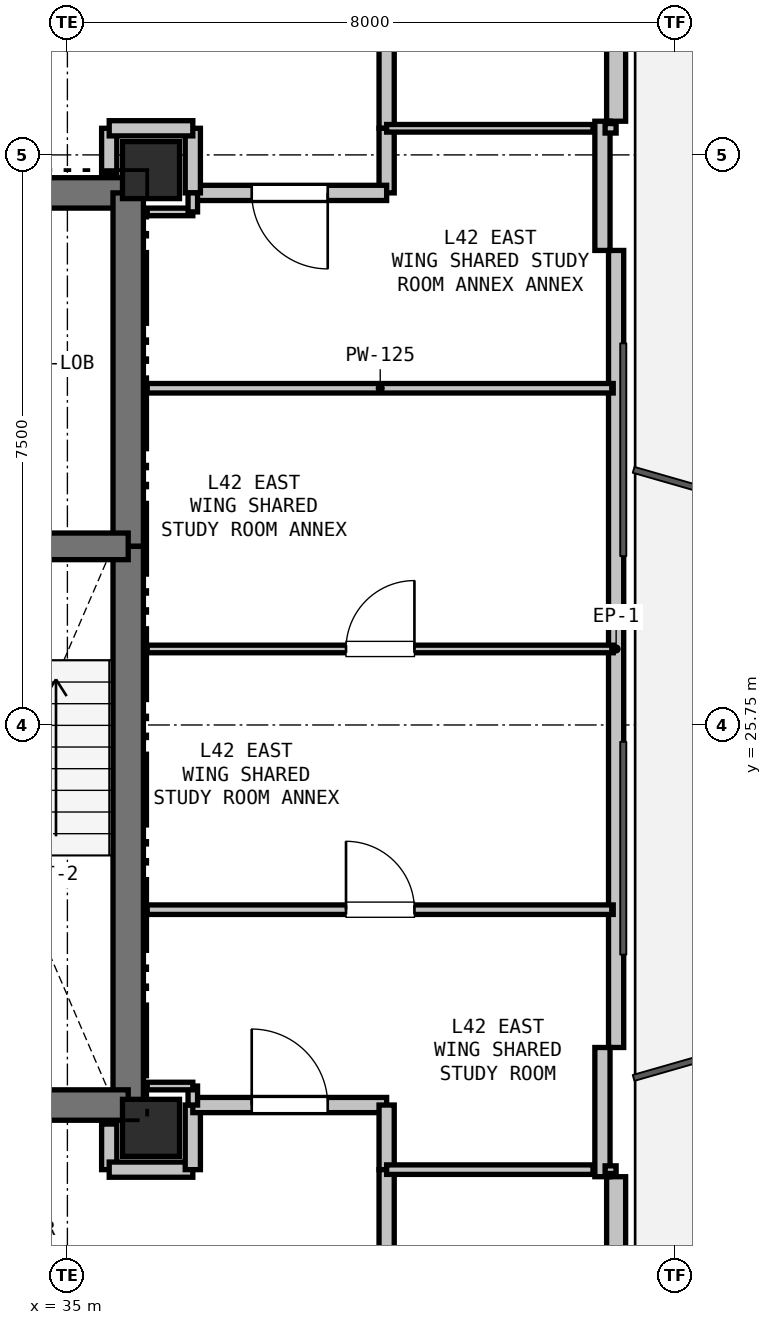
"""IFC4 building model, lengths in metres.
Left out: names, types, materials, properties, quantities, classifications, styles, units other than length and angle.
Written with IfcOpenShell. Run it as: python <this file> out.ifc"""

import sys

from ifc_helpers import new_model, si_unit, direction, frame, frame_2d, origin, origin_2d, place, context, subcontext, project, spatial, rectangle, extrude, element, fill, save


model = new_model("IFC4")
c1 = context("Model", 3, precision=1e-05, world=origin(), true_north=direction((0.0, 1.0)))
c2 = subcontext(c1, "Body", "Model", "MODEL_VIEW")
j1 = project(units=[si_unit("LENGTHUNIT", "METRE"), si_unit("PLANEANGLEUNIT", "RADIAN")], contexts=[c1])
p1 = place(None, origin())
s1 = spatial("IfcSite", under=j1, at=p1, CompositionType="ELEMENT")
p2 = place(p1, origin())
s2 = spatial("IfcBuilding", under=s1, at=p2, CompositionType="ELEMENT")
p3 = place(p2, frame((0.0, 0.0, 150.9)))
s3 = spatial("IfcBuildingStorey", under=s2, at=p3, CompositionType="ELEMENT", Elevation=150.9)
for number, where, z_axis, x_axis in (
    (1, (36.1, 33.05, 0.0), (0.0, 0.0, 1.0), (1.0, 0.0, 0.0)),
    (2, (36.1, 20.45, 0.0), (0.0, 0.0, 1.0), (1.0, 0.0, 0.0)),
):
    element("IfcColumn", number, at=place(p3, frame(where, z_axis=z_axis, x_axis=x_axis)), inside=s3, PredefinedType="COLUMN", context=c2, shape_type="SweptSolid", body=[
        extrude(rectangle(XDim=0.75, YDim=0.75, at=origin_2d()), origin(), (0.0, 0.0, 1.0), 3.3),
    ])
p4 = place(p3, frame((42.219, 44.879, 0.0), z_axis=(0.0, 0.0, 1.0), x_axis=(0.0, -1.0, 0.0)))
e3 = element("IfcWall", 3, at=p4, inside=s3, PredefinedType="SOLIDWALL", context=c2, shape_type="SweptSolid", body=[
    extrude(rectangle(XDim=11.186, YDim=0.25, at=frame_2d((5.593, 0.0))), origin(), (0.0, 0.0, 1.0), 2.68),
])
p5 = place(p4, frame((7.095, 0.0, 0.0)))
e4 = element("IfcOpeningElement", 4, at=p5, cuts=e3, PredefinedType="OPENING", context=c2, shape_type="SweptSolid", body=[
    extrude(rectangle(XDim=1.1, YDim=2.1, at=frame_2d((0.55, 1.05))), frame((0.0, 0.135, 0.0), z_axis=(0.0, -1.0, 0.0), x_axis=(1.0, 0.0, 0.0)), (0.0, 0.0, 1.0), 0.27),
])
p6 = place(p3, frame((42.219, 31.993, 0.0), z_axis=(0.0, 0.0, 1.0), x_axis=(0.0, -1.0, 0.0)))
e5 = element("IfcWall", 5, at=p6, inside=s3, PredefinedType="PARAPET", context=c2, shape_type="SweptSolid", body=[
    extrude(rectangle(XDim=10.486, YDim=0.2, at=frame_2d((5.243, 0.0))), origin(), (0.0, 0.0, 1.0), 0.2),
])
p7 = place(p3, frame((42.219, 19.807, 0.0), z_axis=(0.0, 0.0, 1.0), x_axis=(0.0, -1.0, 0.0)))
e6 = element("IfcWall", 6, at=p7, inside=s3, PredefinedType="SOLIDWALL", context=c2, shape_type="SweptSolid", body=[
    extrude(rectangle(XDim=11.186, YDim=0.25, at=frame_2d((5.593, 0.0))), origin(), (0.0, 0.0, 1.0), 2.68),
])
p8 = place(p7, frame((2.796, 0.0, 0.9)))
e7 = element("IfcOpeningElement", 7, at=p8, cuts=e6, PredefinedType="OPENING", context=c2, shape_type="SweptSolid", body=[
    extrude(rectangle(XDim=1.2, YDim=1.5, at=frame_2d((0.6, 0.75))), frame((0.0, 0.135, 0.0), z_axis=(0.0, -1.0, 0.0), x_axis=(1.0, 0.0, 0.0)), (0.0, 0.0, 1.0), 0.27),
])
for number, where, z_axis, x_axis in (
    (8, (42.039, 33.693, 0.0), (0.0, 0.0, 1.0), (0.0, -1.0, 0.0)),
    (9, (42.039, 21.507, 0.0), (0.0, 0.0, 1.0), (0.0, -1.0, 0.0)),
):
    element("IfcWall", number, at=place(p3, frame(where, z_axis=z_axis, x_axis=x_axis)), inside=s3, PredefinedType="PARAPET", context=c2, shape_type="SweptSolid", body=[
        extrude(rectangle(XDim=1.7, YDim=0.2, at=frame_2d((0.85, 0.0))), origin(), (0.0, 0.0, 1.0), 2.68),
    ])
p9 = place(p3, frame((32.35, 32.75, 0.0), z_axis=(0.0, 0.0, 1.0), x_axis=(1.0, 0.0, 0.0)))
e10 = element("IfcWall", 10, at=p9, inside=s3, PredefinedType="SHEAR", context=c2, shape_type="SweptSolid", body=[
    extrude(rectangle(XDim=3.45, YDim=0.4, at=frame_2d((1.725, 0.0))), origin(), (0.0, 0.0, 1.0), 3.06),
])
p10 = place(p9, frame((0.65, 0.0, 0.0)))
e11 = element("IfcOpeningElement", 11, at=p10, cuts=e10, PredefinedType="OPENING", context=c2, shape_type="SweptSolid", body=[
    extrude(rectangle(XDim=1.15, YDim=2.15, at=frame_2d((0.575, 1.075))), frame((0.0, 0.21, 0.0), z_axis=(0.0, -1.0, 0.0), x_axis=(1.0, 0.0, 0.0)), (0.0, 0.0, 1.0), 0.42),
])
p11 = place(p3, frame((35.8, 32.75, 0.0), z_axis=(0.0, 0.0, 1.0), x_axis=(0.0, -1.0, 0.0)))
e12 = element("IfcWall", 12, at=p11, inside=s3, PredefinedType="SHEAR", context=c2, shape_type="SweptSolid", body=[
    extrude(rectangle(XDim=4.65, YDim=0.4, at=frame_2d((2.325, 0.0))), origin(), (0.0, 0.0, 1.0), 3.06),
])
p12 = place(p3, frame((35.8, 28.1, 0.0), z_axis=(0.0, 0.0, 1.0), x_axis=(0.0, -1.0, 0.0)))
e13 = element("IfcWall", 13, at=p12, inside=s3, PredefinedType="SHEAR", context=c2, shape_type="SweptSolid", body=[
    extrude(rectangle(XDim=7.35, YDim=0.4, at=frame_2d((3.675, 0.0))), origin(), (0.0, 0.0, 1.0), 3.06),
])
p13 = place(p3, frame((35.8, 20.75, 0.0), z_axis=(0.0, 0.0, 1.0), x_axis=(-1.0, 0.0, 0.0)))
e14 = element("IfcWall", 14, at=p13, inside=s3, PredefinedType="SHEAR", context=c2, shape_type="SweptSolid", body=[
    extrude(rectangle(XDim=3.45, YDim=0.4, at=frame_2d((1.725, 0.0))), origin(), (0.0, 0.0, 1.0), 3.06),
])
p14 = place(p3, frame((32.35, 28.1, 0.0), z_axis=(0.0, 0.0, 1.0), x_axis=(1.0, 0.0, 0.0)))
e15 = element("IfcWall", 15, at=p14, inside=s3, PredefinedType="SHEAR", context=c2, shape_type="SweptSolid", body=[
    extrude(rectangle(XDim=3.45, YDim=0.35, at=frame_2d((1.725, 0.0))), origin(), (0.0, 0.0, 1.0), 3.06),
])
p15 = place(p14, frame((1.15, 0.0, 0.0)))
e16 = element("IfcOpeningElement", 16, at=p15, cuts=e15, PredefinedType="OPENING", context=c2, shape_type="SweptSolid", body=[
    extrude(rectangle(XDim=1.15, YDim=2.15, at=frame_2d((0.575, 1.075))), frame((0.0, 0.185, 0.0), z_axis=(0.0, -1.0, 0.0), x_axis=(1.0, 0.0, 0.0)), (0.0, 0.0, 1.0), 0.37),
])
p16 = place(p3, frame((35.55, 33.6, 0.0), z_axis=(0.0, 0.0, 1.0), x_axis=(0.0, -1.0, 0.0)))
e17 = element("IfcWall", 17, at=p16, inside=s3, PredefinedType="PARTITIONING", context=c2, shape_type="SweptSolid", body=[
    extrude(rectangle(XDim=0.6, YDim=0.2, at=frame_2d((0.3, 0.0))), origin(), (0.0, 0.0, 1.0), 2.585),
])
p17 = place(p3, frame((39.2, 35.35, 0.0), z_axis=(0.0, 0.0, 1.0), x_axis=(0.0, -1.0, 0.0)))
e18 = element("IfcWall", 18, at=p17, inside=s3, PredefinedType="PARTITIONING", context=c2, shape_type="SweptSolid", body=[
    extrude(rectangle(XDim=1.75, YDim=0.2, at=frame_2d((0.875, 0.0))), origin(), (0.0, 0.0, 1.0), 3.06),
])
p18 = place(p3, frame((39.2, 33.6, 0.0), z_axis=(0.0, 0.0, 1.0), x_axis=(0.0, -1.0, 0.0)))
e19 = element("IfcWall", 19, at=p18, inside=s3, PredefinedType="PARTITIONING", context=c2, shape_type="SweptSolid", body=[
    extrude(rectangle(XDim=0.85, YDim=0.2, at=frame_2d((0.425, 0.0))), origin(), (0.0, 0.0, 1.0), 3.06),
])
p19 = place(p3, frame((39.2, 32.75, 0.0), z_axis=(0.0, 0.0, 1.0), x_axis=(-1.0, 0.0, 0.0)))
e20 = element("IfcWall", 20, at=p19, inside=s3, PredefinedType="PARTITIONING", context=c2, shape_type="SweptSolid", body=[
    extrude(rectangle(XDim=2.55, YDim=0.2, at=frame_2d((1.275, 0.0))), origin(), (0.0, 0.0, 1.0), 3.06),
])
p20 = place(p19, frame((0.775, 0.0, 0.0)))
e21 = element("IfcOpeningElement", 21, at=p20, cuts=e20, PredefinedType="OPENING", context=c2, shape_type="SweptSolid", body=[
    extrude(rectangle(XDim=1.0, YDim=2.15, at=frame_2d((0.5, 1.075))), frame((0.0, 0.11, 0.0), z_axis=(0.0, -1.0, 0.0), x_axis=(1.0, 0.0, 0.0)), (0.0, 0.0, 1.0), 0.22),
])
p21 = place(p3, frame((36.65, 32.75, 0.0), z_axis=(0.0, 0.0, 1.0), x_axis=(0.0, 1.0, 0.0)))
e22 = element("IfcWall", 22, at=p21, inside=s3, PredefinedType="PARTITIONING", context=c2, shape_type="SweptSolid", body=[
    extrude(rectangle(XDim=0.85, YDim=0.2, at=frame_2d((0.425, 0.0))), origin(), (0.0, 0.0, 1.0), 2.433),
])
p22 = place(p3, frame((36.65, 33.6, 0.0), z_axis=(0.0, 0.0, 1.0), x_axis=(-1.0, 0.0, 0.0)))
e23 = element("IfcWall", 23, at=p22, inside=s3, PredefinedType="PARTITIONING", context=c2, shape_type="SweptSolid", body=[
    extrude(rectangle(XDim=1.1, YDim=0.2, at=frame_2d((0.55, 0.0))), origin(), (0.0, 0.0, 1.0), 2.433),
])
p23 = place(p3, frame((35.55, 20.5, 0.0), z_axis=(0.0, 0.0, 1.0), x_axis=(0.0, -1.0, 0.0)))
e24 = element("IfcWall", 24, at=p23, inside=s3, PredefinedType="PARTITIONING", context=c2, shape_type="SweptSolid", body=[
    extrude(rectangle(XDim=0.6, YDim=0.2, at=frame_2d((0.3, 0.0))), origin(), (0.0, 0.0, 1.0), 2.585),
])
p24 = place(p3, frame((35.55, 19.9, 0.0), z_axis=(0.0, 0.0, 1.0), x_axis=(1.0, 0.0, 0.0)))
e25 = element("IfcWall", 25, at=p24, inside=s3, PredefinedType="PARTITIONING", context=c2, shape_type="SweptSolid", body=[
    extrude(rectangle(XDim=1.1, YDim=0.2, at=frame_2d((0.55, 0.0))), origin(), (0.0, 0.0, 1.0), 2.433),
])
p25 = place(p3, frame((36.65, 19.9, 0.0), z_axis=(0.0, 0.0, 1.0), x_axis=(0.0, 1.0, 0.0)))
e26 = element("IfcWall", 26, at=p25, inside=s3, PredefinedType="PARTITIONING", context=c2, shape_type="SweptSolid", body=[
    extrude(rectangle(XDim=0.85, YDim=0.2, at=frame_2d((0.425, 0.0))), origin(), (0.0, 0.0, 1.0), 3.06),
])
p26 = place(p3, frame((36.65, 20.75, 0.0), z_axis=(0.0, 0.0, 1.0), x_axis=(1.0, 0.0, 0.0)))
e27 = element("IfcWall", 27, at=p26, inside=s3, PredefinedType="PARTITIONING", context=c2, shape_type="SweptSolid", body=[
    extrude(rectangle(XDim=2.55, YDim=0.2, at=frame_2d((1.275, 0.0))), origin(), (0.0, 0.0, 1.0), 3.06),
])
p27 = place(p26, frame((0.775, 0.0, 0.0)))
e28 = element("IfcOpeningElement", 28, at=p27, cuts=e27, PredefinedType="OPENING", context=c2, shape_type="SweptSolid", body=[
    extrude(rectangle(XDim=1.0, YDim=2.15, at=frame_2d((0.5, 1.075))), frame((0.0, 0.11, 0.0), z_axis=(0.0, -1.0, 0.0), x_axis=(1.0, 0.0, 0.0)), (0.0, 0.0, 1.0), 0.22),
])
p28 = place(p3, frame((39.2, 20.75, 0.0), z_axis=(0.0, 0.0, 1.0), x_axis=(0.0, -1.0, 0.0)))
e29 = element("IfcWall", 29, at=p28, inside=s3, PredefinedType="PARTITIONING", context=c2, shape_type="SweptSolid", body=[
    extrude(rectangle(XDim=0.85, YDim=0.2, at=frame_2d((0.425, 0.0))), origin(), (0.0, 0.0, 1.0), 3.06),
])
p29 = place(p3, frame((39.2, 19.9, 0.0), z_axis=(0.0, 0.0, 1.0), x_axis=(0.0, -1.0, 0.0)))
e30 = element("IfcWall", 30, at=p29, inside=s3, PredefinedType="PARTITIONING", context=c2, shape_type="SweptSolid", body=[
    extrude(rectangle(XDim=1.75, YDim=0.2, at=frame_2d((0.875, 0.0))), origin(), (0.0, 0.0, 1.0), 3.06),
])
p30 = place(p3, frame((36.65, 20.75, 0.0), z_axis=(0.0, 0.0, 1.0), x_axis=(0.0, 1.0, 0.0)))
e31 = element("IfcWall", 31, at=p30, inside=s3, PredefinedType="PARTITIONING", context=c2, shape_type="SweptSolid", body=[
    extrude(rectangle(XDim=0.25, YDim=0.125, at=frame_2d((0.125, 0.0))), origin(), (0.0, 0.0, 1.0), 3.06),
])
p31 = place(p3, frame((36.65, 21.0, 0.0), z_axis=(0.0, 0.0, 1.0), x_axis=(-1.0, 0.0, 0.0)))
e32 = element("IfcWall", 32, at=p31, inside=s3, PredefinedType="PARTITIONING", context=c2, shape_type="SweptSolid", body=[
    extrude(rectangle(XDim=0.6, YDim=0.1, at=frame_2d((0.3, 0.0))), origin(), (0.0, 0.0, 1.0), 2.585),
])
p32 = place(p3, frame((36.05, 23.32, 0.0), z_axis=(0.0, 0.0, 1.0), x_axis=(1.0, 0.0, 0.0)))
e33 = element("IfcWall", 33, at=p32, inside=s3, PredefinedType="PARTITIONING", context=c2, shape_type="SweptSolid", body=[
    extrude(rectangle(XDim=6.131, YDim=0.125, at=frame_2d((3.065, 0.0))), origin(), (0.0, 0.0, 1.0), 2.365),
])
p33 = place(p32, frame((2.615, 0.0, 0.0)))
e34 = element("IfcOpeningElement", 34, at=p33, cuts=e33, PredefinedType="OPENING", context=c2, shape_type="SweptSolid", body=[
    extrude(rectangle(XDim=0.9, YDim=2.1, at=frame_2d((0.45, 1.05))), frame((0.0, 0.073, 0.0), z_axis=(0.0, -1.0, 0.0), x_axis=(1.0, 0.0, 0.0)), (0.0, 0.0, 1.0), 0.145),
])
p34 = place(p3, frame((42.219, 19.9, 0.0), z_axis=(0.0, 0.0, 1.0), x_axis=(-1.0, 0.0, 0.0)))
e35 = element("IfcWall", 35, at=p34, inside=s3, PredefinedType="PARTITIONING", context=c2, shape_type="SweptSolid", body=[
    extrude(rectangle(XDim=0.145, YDim=0.1, at=frame_2d((0.072, 0.0))), origin(), (0.0, 0.0, 1.0), 3.06),
])
p35 = place(p3, frame((41.915, 19.9, 0.0), z_axis=(0.0, 0.0, 1.0), x_axis=(-1.0, 0.0, 0.0)))
e36 = element("IfcWall", 36, at=p35, inside=s3, PredefinedType="PARTITIONING", context=c2, shape_type="SweptSolid", body=[
    extrude(rectangle(XDim=2.715, YDim=0.125, at=frame_2d((1.358, 0.0))), origin(), (0.0, 0.0, 1.0), 2.365),
])
p36 = place(p3, frame((36.05, 26.75, 0.0), z_axis=(0.0, 0.0, 1.0), x_axis=(1.0, 0.0, 0.0)))
e37 = element("IfcWall", 37, at=p36, inside=s3, PredefinedType="PARTITIONING", context=c2, shape_type="SweptSolid", body=[
    extrude(rectangle(XDim=6.131, YDim=0.1, at=frame_2d((3.065, 0.0))), origin(), (0.0, 0.0, 1.0), 2.365),
])
p37 = place(p36, frame((2.615, 0.0, 0.0)))
e38 = element("IfcOpeningElement", 38, at=p37, cuts=e37, PredefinedType="OPENING", context=c2, shape_type="SweptSolid", body=[
    extrude(rectangle(XDim=0.9, YDim=2.1, at=frame_2d((0.45, 1.05))), frame((0.0, 0.06, 0.0), z_axis=(0.0, -1.0, 0.0), x_axis=(1.0, 0.0, 0.0)), (0.0, 0.0, 1.0), 0.12),
])
p38 = place(p3, frame((36.05, 30.18, 0.0), z_axis=(0.0, 0.0, 1.0), x_axis=(1.0, 0.0, 0.0)))
e39 = element("IfcWall", 39, at=p38, inside=s3, PredefinedType="PARTITIONING", context=c2, shape_type="SweptSolid", body=[
    extrude(rectangle(XDim=6.131, YDim=0.125, at=frame_2d((3.065, 0.0))), origin(), (0.0, 0.0, 1.0), 2.365),
])
p39 = place(p3, frame((39.2, 33.6, 0.0), z_axis=(0.0, 0.0, 1.0), x_axis=(1.0, 0.0, 0.0)))
e40 = element("IfcWall", 40, at=p39, inside=s3, PredefinedType="PARTITIONING", context=c2, shape_type="SweptSolid", body=[
    extrude(rectangle(XDim=2.715, YDim=0.1, at=frame_2d((1.358, 0.0))), origin(), (0.0, 0.0, 1.0), 2.365),
])
p40 = place(p3, frame((42.074, 33.6, 0.0), z_axis=(0.0, 0.0, 1.0), x_axis=(1.0, 0.0, 0.0)))
e41 = element("IfcWall", 41, at=p40, inside=s3, PredefinedType="PARTITIONING", context=c2, shape_type="SweptSolid", body=[
    extrude(rectangle(XDim=0.145, YDim=0.125, at=frame_2d((0.072, 0.0))), origin(), (0.0, 0.0, 1.0), 3.06),
])
p41 = place(p3, frame((36.05, 32.5, 0.0), z_axis=(0.0, 0.0, 1.0), x_axis=(1.0, 0.0, 0.0)))
e42 = element("IfcWall", 42, at=p41, inside=s3, PredefinedType="PARTITIONING", context=c2, shape_type="SweptSolid", body=[
    extrude(rectangle(XDim=0.6, YDim=0.1, at=frame_2d((0.3, 0.0))), origin(), (0.0, 0.0, 1.0), 2.585),
])
p42 = place(p3, frame((36.65, 32.5, 0.0), z_axis=(0.0, 0.0, 1.0), x_axis=(0.0, 1.0, 0.0)))
e43 = element("IfcWall", 43, at=p42, inside=s3, PredefinedType="PARTITIONING", context=c2, shape_type="SweptSolid", body=[
    extrude(rectangle(XDim=0.25, YDim=0.125, at=frame_2d((0.125, 0.0))), origin(), (0.0, 0.0, 1.0), 3.06),
])
p43 = place(p20, origin())
e44 = element("IfcDoor", 44, at=p43, inside=s3, OperationType="SINGLE_SWING_LEFT", PredefinedType="DOOR", context=c2, shape_type="SweptSolid", body=[
    extrude(rectangle(XDim=1.0, YDim=2.15, at=frame_2d((0.5, 1.075))), frame((0.0, 0.025, 0.0), z_axis=(0.0, -1.0, 0.0), x_axis=(1.0, 0.0, 0.0)), (0.0, 0.0, 1.0), 0.05),
])
fill(e21, e44)
p44 = place(p27, origin())
e45 = element("IfcDoor", 45, at=p44, inside=s3, OperationType="SINGLE_SWING_LEFT", PredefinedType="DOOR", context=c2, shape_type="SweptSolid", body=[
    extrude(rectangle(XDim=1.0, YDim=2.15, at=frame_2d((0.5, 1.075))), frame((0.0, 0.025, 0.0), z_axis=(0.0, -1.0, 0.0), x_axis=(1.0, 0.0, 0.0)), (0.0, 0.0, 1.0), 0.05),
])
fill(e28, e45)
p45 = place(p33, origin())
e46 = element("IfcDoor", 46, at=p45, inside=s3, OperationType="SINGLE_SWING_LEFT", PredefinedType="DOOR", context=c2, shape_type="SweptSolid", body=[
    extrude(rectangle(XDim=0.9, YDim=2.1, at=frame_2d((0.45, 1.05))), frame((0.0, 0.025, 0.0), z_axis=(0.0, -1.0, 0.0), x_axis=(1.0, 0.0, 0.0)), (0.0, 0.0, 1.0), 0.05),
])
fill(e34, e46)
p46 = place(p37, origin())
e47 = element("IfcDoor", 47, at=p46, inside=s3, OperationType="SINGLE_SWING_RIGHT", PredefinedType="DOOR", context=c2, shape_type="SweptSolid", body=[
    extrude(rectangle(XDim=0.9, YDim=2.1, at=frame_2d((0.45, 1.05))), frame((0.0, 0.025, 0.0), z_axis=(0.0, -1.0, 0.0), x_axis=(1.0, 0.0, 0.0)), (0.0, 0.0, 1.0), 0.05),
])
fill(e38, e47)
save(model, sys.argv[1])
